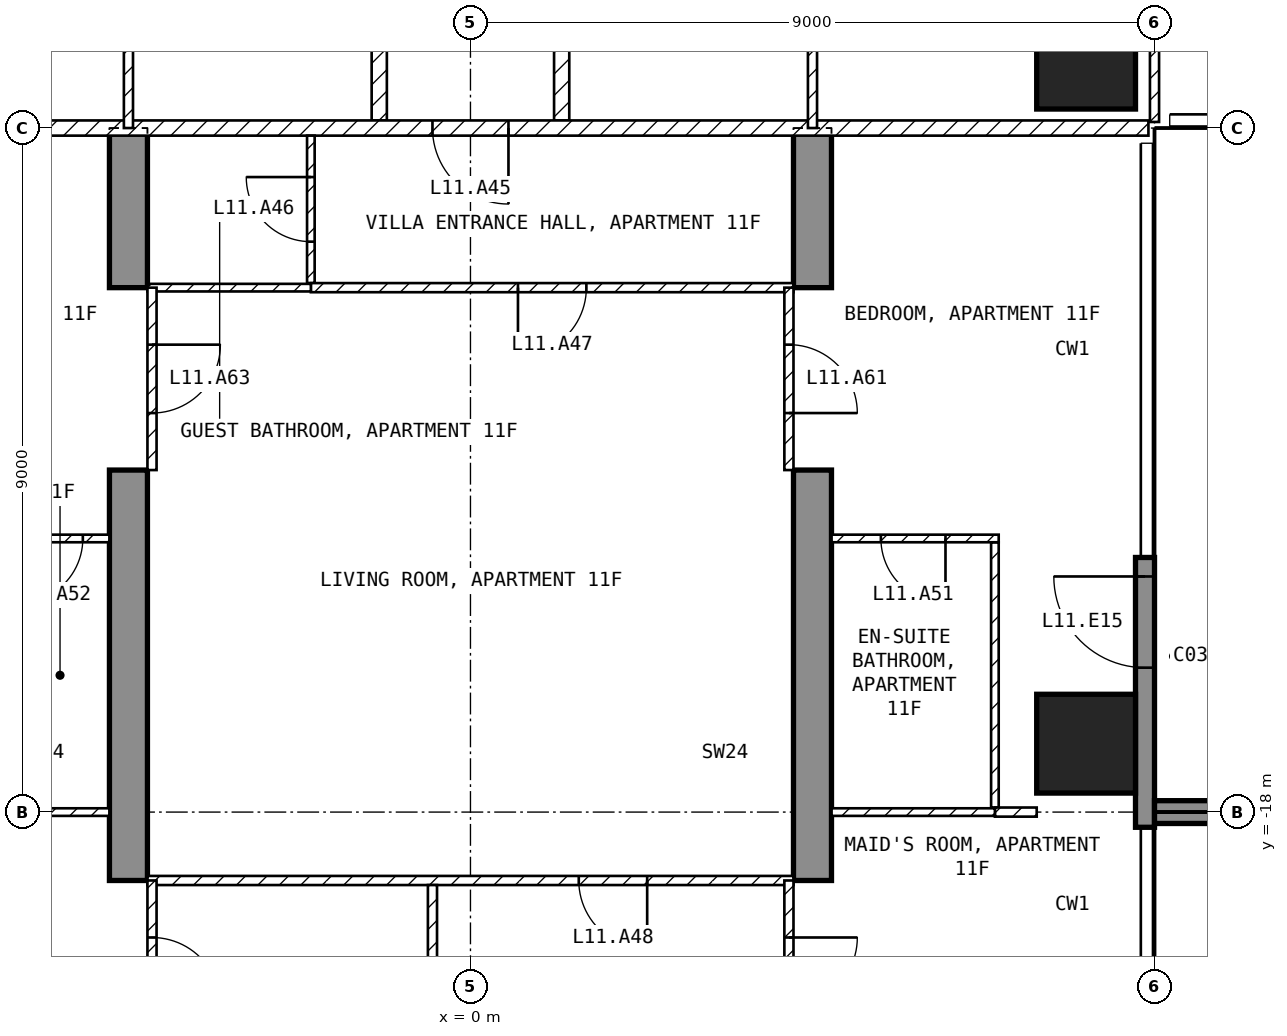
"""IFC4 building model, lengths in metres.
Left out: names, types, materials, properties, quantities, classifications, styles, units other than length and angle.
Written with IfcOpenShell. Run it as: python <this file> out.ifc"""

import sys

from ifc_helpers import new_model, si_unit, direction, frame, frame_2d, origin, origin_2d, place, context, subcontext, project, spatial, polyline, rectangle, outline, extrude, element, fill, save


model = new_model("IFC4")
c1 = context("Model", 3, precision=1e-05, world=origin(), true_north=direction((0.0, 1.0)))
c2 = subcontext(c1, "Body", "Model", "MODEL_VIEW")
j1 = project(units=[si_unit("LENGTHUNIT", "METRE"), si_unit("PLANEANGLEUNIT", "RADIAN")], contexts=[c1])
p1 = place(None, origin())
s1 = spatial("IfcSite", under=j1, at=p1, CompositionType="ELEMENT")
p2 = place(p1, origin())
s2 = spatial("IfcBuilding", under=s1, at=p2, CompositionType="ELEMENT")
p3 = place(p2, frame((0.0, 0.0, 57.5)))
s3 = spatial("IfcBuildingStorey", under=s2, at=p3, CompositionType="ELEMENT", Elevation=57.5)
for number, where, z_axis, x_axis in (
    (1, (8.1, -17.1, -0.25), (0.0, 0.0, 1.0), (1.0, 0.0, 0.0)),
    (2, (8.1, -8.1, -0.25), (0.0, 0.0, 1.0), (1.0, 0.0, 0.0)),
):
    element("IfcColumn", number, at=place(p3, frame(where, z_axis=z_axis, x_axis=x_axis)), inside=s3, PredefinedType="COLUMN", context=c2, shape_type="SweptSolid", body=[
        extrude(rectangle(XDim=1.3, YDim=1.3, at=origin_2d()), origin(), (0.0, 0.0, 1.0), 3.5),
    ])
for number, where, z_axis, x_axis in (
    (3, (-4.75, -25.45, -0.25), (1.0, 0.0, 0.0), (0.0, 1.0, 0.0)),
    (4, (4.25, -25.45, -0.25), (1.0, 0.0, 0.0), (0.0, 1.0, 0.0)),
):
    element("IfcWall", number, at=place(p3, frame(where, z_axis=z_axis, x_axis=x_axis)), inside=s3, PredefinedType="SHEAR", context=c2, shape_type="SweptSolid", body=[
        extrude(outline(polyline([(0.0, 0.0), (4.15, 0.0), (4.15, 2.65), (6.55, 2.65), (6.55, 0.0), (11.95, 0.0), (11.95, 2.65), (14.35, 2.65), (14.35, 0.0), (16.45, 0.0), (16.45, 3.5), (0.0, 3.5), (0.0, 0.0)])), origin(), (0.0, 0.0, 1.0), 0.5),
    ])
p4 = place(p3, frame((8.875, -18.2, 0.0), z_axis=(0.0, 0.0, 1.0), x_axis=(0.0, 1.0, 0.0)))
e5 = element("IfcWall", 5, at=p4, inside=s3, PredefinedType="SOLIDWALL", context=c2, shape_type="SweptSolid", body=[
    extrude(rectangle(XDim=3.55, YDim=0.25, at=frame_2d((1.775, 0.0))), origin(), (0.0, 0.0, 1.0), 3.25),
])
p5 = place(p4, frame((2.1, 0.0, 0.0)))
e6 = element("IfcOpeningElement", 6, at=p5, cuts=e5, PredefinedType="OPENING", context=c2, shape_type="SweptSolid", body=[
    extrude(rectangle(XDim=1.2, YDim=2.4, at=frame_2d((0.6, 1.2))), frame((0.0, 0.135, 0.0), z_axis=(0.0, -1.0, 0.0), x_axis=(1.0, 0.0, 0.0)), (0.0, 0.0, 1.0), 0.27),
])
p6 = place(p3, frame((9.0, -18.0, 0.0), z_axis=(0.0, 0.0, 1.0), x_axis=(1.0, 0.0, 0.0)))
e7 = element("IfcWall", 7, at=p6, inside=s3, PredefinedType="SOLIDWALL", context=c2, shape_type="SweptSolid", body=[
    extrude(rectangle(XDim=2.7, YDim=0.3, at=frame_2d((1.35, 0.0))), origin(), (0.0, 0.0, 1.0), 3.25),
])
for number, where, z_axis, x_axis in (
    (8, (1.2, -1.3, 0.0), (0.0, 0.0, 1.0), (0.0, -1.0, 0.0)),
    (9, (-1.2, -8.9, 0.0), (0.0, 0.0, 1.0), (0.0, 1.0, 0.0)),
):
    element("IfcWall", number, at=place(p3, frame(where, z_axis=z_axis, x_axis=x_axis)), inside=s3, PredefinedType="PARTITIONING", context=c2, shape_type="SweptSolid", body=[
        extrude(rectangle(XDim=7.6, YDim=0.2, at=frame_2d((3.8, 0.0))), origin(), (0.0, 0.0, 1.0), 3.25),
    ])
p7 = place(p3, frame((8.92, -9.0, 0.0), z_axis=(0.0, 0.0, 1.0), x_axis=(-1.0, 0.0, 0.0)))
e10 = element("IfcWall", 10, at=p7, inside=s3, PredefinedType="PARTITIONING", context=c2, shape_type="SweptSolid", body=[
    extrude(rectangle(XDim=17.84, YDim=0.2, at=frame_2d((8.92, 0.0))), origin(), (0.0, 0.0, 1.0), 3.25),
])
p8 = place(p7, frame((8.42, 0.0, 0.0)))
e11 = element("IfcOpeningElement", 11, at=p8, cuts=e10, PredefinedType="OPENING", context=c2, shape_type="SweptSolid", body=[
    extrude(rectangle(XDim=1.0, YDim=2.1, at=frame_2d((0.5, 1.05))), frame((0.0, 0.11, 0.0), z_axis=(0.0, -1.0, 0.0), x_axis=(1.0, 0.0, 0.0)), (0.0, 0.0, 1.0), 0.22),
])
p9 = place(p3, frame((9.0, -8.92, 0.0), z_axis=(0.0, 0.0, 1.0), x_axis=(0.0, 1.0, 0.0)))
e12 = element("IfcWall", 12, at=p9, inside=s3, PredefinedType="PARTITIONING", context=c2, shape_type="SweptSolid", body=[
    extrude(rectangle(XDim=7.62, YDim=0.12, at=frame_2d((3.81, 0.0))), origin(), (0.0, 0.0, 1.0), 3.25),
])
p10 = place(p9, frame((2.67, 0.0, 0.0)))
e13 = element("IfcOpeningElement", 13, at=p10, cuts=e12, PredefinedType="OPENING", context=c2, shape_type="SweptSolid", body=[
    extrude(rectangle(XDim=0.9, YDim=2.1, at=frame_2d((0.45, 1.05))), frame((0.0, 0.07, 0.0), z_axis=(0.0, -1.0, 0.0), x_axis=(1.0, 0.0, 0.0)), (0.0, 0.0, 1.0), 0.14),
])
p11 = place(p3, frame((4.5, -9.0, 0.0), z_axis=(0.0, 0.0, 1.0), x_axis=(0.0, 1.0, 0.0)))
e14 = element("IfcWall", 14, at=p11, inside=s3, PredefinedType="PARTITIONING", context=c2, shape_type="SweptSolid", body=[
    extrude(rectangle(XDim=7.7, YDim=0.12, at=frame_2d((3.85, 0.0))), origin(), (0.0, 0.0, 1.0), 3.25),
])
p12 = place(p11, frame((3.4, 0.0, 0.0)))
e15 = element("IfcOpeningElement", 15, at=p12, cuts=e14, PredefinedType="OPENING", context=c2, shape_type="SweptSolid", body=[
    extrude(rectangle(XDim=0.9, YDim=2.1, at=frame_2d((0.45, 1.05))), frame((0.0, 0.07, 0.0), z_axis=(0.0, -1.0, 0.0), x_axis=(1.0, 0.0, 0.0)), (0.0, 0.0, 1.0), 0.14),
])
p13 = place(p3, frame((-4.5, -1.3, 0.0), z_axis=(0.0, 0.0, 1.0), x_axis=(0.0, -1.0, 0.0)))
e16 = element("IfcWall", 16, at=p13, inside=s3, PredefinedType="PARTITIONING", context=c2, shape_type="SweptSolid", body=[
    extrude(rectangle(XDim=7.7, YDim=0.12, at=frame_2d((3.85, 0.0))), origin(), (0.0, 0.0, 1.0), 3.25),
])
p14 = place(p13, frame((4.988, 0.0, 0.0)))
e17 = element("IfcOpeningElement", 17, at=p14, cuts=e16, PredefinedType="OPENING", context=c2, shape_type="SweptSolid", body=[
    extrude(rectangle(XDim=0.9, YDim=2.1, at=frame_2d((0.45, 1.05))), frame((0.0, 0.07, 0.0), z_axis=(0.0, -1.0, 0.0), x_axis=(1.0, 0.0, 0.0)), (0.0, 0.0, 1.0), 0.14),
])
p15 = place(p3, frame((-2.1, -11.04, 0.0), z_axis=(0.0, 0.0, 1.0), x_axis=(0.0, 1.0, 0.0)))
e18 = element("IfcWall", 18, at=p15, inside=s3, PredefinedType="PARTITIONING", context=c2, shape_type="SweptSolid", body=[
    extrude(rectangle(XDim=1.94, YDim=0.1, at=frame_2d((0.97, 0.0))), origin(), (0.0, 0.0, 1.0), 3.25),
])
p16 = place(p15, frame((0.545, 0.0, 0.0)))
e19 = element("IfcOpeningElement", 19, at=p16, cuts=e18, PredefinedType="OPENING", context=c2, shape_type="SweptSolid", body=[
    extrude(rectangle(XDim=0.85, YDim=2.1, at=frame_2d((0.425, 1.05))), frame((0.0, 0.06, 0.0), z_axis=(0.0, -1.0, 0.0), x_axis=(1.0, 0.0, 0.0)), (0.0, 0.0, 1.0), 0.12),
])
p17 = place(p3, frame((4.25, -11.1, 0.0), z_axis=(0.0, 0.0, 1.0), x_axis=(-1.0, 0.0, 0.0)))
e20 = element("IfcWall", 20, at=p17, inside=s3, PredefinedType="PARTITIONING", context=c2, shape_type="SweptSolid", body=[
    extrude(rectangle(XDim=6.35, YDim=0.12, at=frame_2d((3.175, 0.0))), origin(), (0.0, 0.0, 1.0), 3.25),
])
p18 = place(p17, frame((2.725, 0.0, 0.0)))
e21 = element("IfcOpeningElement", 21, at=p18, cuts=e20, PredefinedType="OPENING", context=c2, shape_type="SweptSolid", body=[
    extrude(rectangle(XDim=0.9, YDim=2.1, at=frame_2d((0.45, 1.05))), frame((0.0, 0.07, 0.0), z_axis=(0.0, -1.0, 0.0), x_axis=(1.0, 0.0, 0.0)), (0.0, 0.0, 1.0), 0.14),
])
p19 = place(p3, frame((-2.1, -11.1, 0.0), z_axis=(0.0, 0.0, 1.0), x_axis=(-1.0, 0.0, 0.0)))
e22 = element("IfcWall", 22, at=p19, inside=s3, PredefinedType="PARTITIONING", context=c2, shape_type="SweptSolid", body=[
    extrude(rectangle(XDim=2.15, YDim=0.1, at=frame_2d((1.075, 0.0))), origin(), (0.0, 0.0, 1.0), 3.25),
])
p20 = place(p3, frame((4.25, -18.9, 0.0), z_axis=(0.0, 0.0, 1.0), x_axis=(-1.0, 0.0, 0.0)))
e23 = element("IfcWall", 23, at=p20, inside=s3, PredefinedType="PARTITIONING", context=c2, shape_type="SweptSolid", body=[
    extrude(rectangle(XDim=8.5, YDim=0.12, at=frame_2d((4.25, 0.0))), origin(), (0.0, 0.0, 1.0), 3.25),
])
p21 = place(p20, frame((1.925, 0.0, 0.0)))
e24 = element("IfcOpeningElement", 24, at=p21, cuts=e23, PredefinedType="OPENING", context=c2, shape_type="SweptSolid", body=[
    extrude(rectangle(XDim=0.9, YDim=2.1, at=frame_2d((0.45, 1.05))), frame((0.0, 0.07, 0.0), z_axis=(0.0, -1.0, 0.0), x_axis=(1.0, 0.0, 0.0)), (0.0, 0.0, 1.0), 0.14),
])
p22 = place(p3, frame((-0.5, -23.34, 0.0), z_axis=(0.0, 0.0, 1.0), x_axis=(0.0, 1.0, 0.0)))
e25 = element("IfcWall", 25, at=p22, inside=s3, PredefinedType="PARTITIONING", context=c2, shape_type="SweptSolid", body=[
    extrude(rectangle(XDim=4.38, YDim=0.12, at=frame_2d((2.19, 0.0))), origin(), (0.0, 0.0, 1.0), 3.25),
])
p23 = place(p22, frame((1.74, 0.0, 0.0)))
e26 = element("IfcOpeningElement", 26, at=p23, cuts=e25, PredefinedType="OPENING", context=c2, shape_type="SweptSolid", body=[
    extrude(rectangle(XDim=0.9, YDim=2.1, at=frame_2d((0.45, 1.05))), frame((0.0, 0.07, 0.0), z_axis=(0.0, -1.0, 0.0), x_axis=(1.0, 0.0, 0.0)), (0.0, 0.0, 1.0), 0.14),
])
p24 = place(p3, frame((6.9, -17.94, 0.0), z_axis=(0.0, 0.0, 1.0), x_axis=(0.0, 1.0, 0.0)))
e27 = element("IfcWall", 27, at=p24, inside=s3, PredefinedType="PARTITIONING", context=c2, shape_type="SweptSolid", body=[
    extrude(rectangle(XDim=3.49, YDim=0.1, at=frame_2d((1.745, 0.0))), origin(), (0.0, 0.0, 1.0), 3.25),
])
p25 = place(p3, frame((6.95, -14.4, 0.0), z_axis=(0.0, 0.0, 1.0), x_axis=(-1.0, 0.0, 0.0)))
e28 = element("IfcWall", 28, at=p25, inside=s3, PredefinedType="PARTITIONING", context=c2, shape_type="SweptSolid", body=[
    extrude(rectangle(XDim=2.2, YDim=0.1, at=frame_2d((1.1, 0.0))), origin(), (0.0, 0.0, 1.0), 3.25),
])
p26 = place(p25, frame((0.7, 0.0, 0.0)))
e29 = element("IfcOpeningElement", 29, at=p26, cuts=e28, PredefinedType="OPENING", context=c2, shape_type="SweptSolid", body=[
    extrude(rectangle(XDim=0.85, YDim=2.1, at=frame_2d((0.425, 1.05))), frame((0.0, 0.06, 0.0), z_axis=(0.0, -1.0, 0.0), x_axis=(1.0, 0.0, 0.0)), (0.0, 0.0, 1.0), 0.12),
])
p27 = place(p3, frame((7.45, -18.0, 0.0), z_axis=(0.0, 0.0, 1.0), x_axis=(-1.0, 0.0, 0.0)))
e30 = element("IfcWall", 30, at=p27, inside=s3, PredefinedType="PARTITIONING", context=c2, shape_type="SweptSolid", body=[
    extrude(rectangle(XDim=0.55, YDim=0.12, at=frame_2d((0.275, 0.0))), origin(), (0.0, 0.0, 1.0), 3.25),
])
p28 = place(p3, frame((6.9, -18.0, 0.0), z_axis=(0.0, 0.0, 1.0), x_axis=(-1.0, 0.0, 0.0)))
e31 = element("IfcWall", 31, at=p28, inside=s3, PredefinedType="PARTITIONING", context=c2, shape_type="SweptSolid", body=[
    extrude(rectangle(XDim=2.15, YDim=0.1, at=frame_2d((1.075, 0.0))), origin(), (0.0, 0.0, 1.0), 3.25),
])
p29 = place(p3, frame((-4.75, -14.4, 0.0), z_axis=(0.0, 0.0, 1.0), x_axis=(-1.0, 0.0, 0.0)))
e32 = element("IfcWall", 32, at=p29, inside=s3, PredefinedType="PARTITIONING", context=c2, shape_type="SweptSolid", body=[
    extrude(rectangle(XDim=1.6, YDim=0.1, at=frame_2d((0.8, 0.0))), origin(), (0.0, 0.0, 1.0), 3.25),
])
p30 = place(p29, frame((0.35, 0.0, 0.0)))
e33 = element("IfcOpeningElement", 33, at=p30, cuts=e32, PredefinedType="OPENING", context=c2, shape_type="SweptSolid", body=[
    extrude(rectangle(XDim=0.85, YDim=2.1, at=frame_2d((0.425, 1.05))), frame((0.0, 0.06, 0.0), z_axis=(0.0, -1.0, 0.0), x_axis=(1.0, 0.0, 0.0)), (0.0, 0.0, 1.0), 0.12),
])
p31 = place(p3, frame((-4.75, -18.0, 0.0), z_axis=(0.0, 0.0, 1.0), x_axis=(-1.0, 0.0, 0.0)))
e34 = element("IfcWall", 34, at=p31, inside=s3, PredefinedType="PARTITIONING", context=c2, shape_type="SweptSolid", body=[
    extrude(rectangle(XDim=1.55, YDim=0.1, at=frame_2d((0.775, 0.0))), origin(), (0.0, 0.0, 1.0), 3.25),
])
p32 = place(p3, frame((4.19, -11.1, 0.0), z_axis=(0.0, 0.0, 1.0), x_axis=(0.0, -1.0, 0.0)))
e35 = element("IfcWall", 35, at=p32, inside=s3, PredefinedType="PARTITIONING", context=c2, shape_type="SweptSolid", body=[
    extrude(rectangle(XDim=2.4, YDim=0.12, at=frame_2d((1.2, 0.0))), origin(), (0.0, 0.0, 1.0), 2.4),
])
p33 = place(p32, frame((0.75, 0.0, 0.0)))
e36 = element("IfcOpeningElement", 36, at=p33, cuts=e35, PredefinedType="OPENING", context=c2, shape_type="SweptSolid", body=[
    extrude(rectangle(XDim=0.9, YDim=2.1, at=frame_2d((0.45, 1.05))), frame((0.0, 0.07, 0.0), z_axis=(0.0, -1.0, 0.0), x_axis=(1.0, 0.0, 0.0)), (0.0, 0.0, 1.0), 0.14),
])
p34 = place(p3, frame((4.19, -18.9, 0.0), z_axis=(0.0, 0.0, 1.0), x_axis=(0.0, -1.0, 0.0)))
e37 = element("IfcWall", 37, at=p34, inside=s3, PredefinedType="PARTITIONING", context=c2, shape_type="SweptSolid", body=[
    extrude(rectangle(XDim=2.4, YDim=0.12, at=frame_2d((1.2, 0.0))), origin(), (0.0, 0.0, 1.0), 2.4),
])
p35 = place(p34, frame((0.75, 0.0, 0.0)))
e38 = element("IfcOpeningElement", 38, at=p35, cuts=e37, PredefinedType="OPENING", context=c2, shape_type="SweptSolid", body=[
    extrude(rectangle(XDim=0.9, YDim=2.1, at=frame_2d((0.45, 1.05))), frame((0.0, 0.07, 0.0), z_axis=(0.0, -1.0, 0.0), x_axis=(1.0, 0.0, 0.0)), (0.0, 0.0, 1.0), 0.14),
])
p36 = place(p3, frame((-4.19, -11.1, 0.0), z_axis=(0.0, 0.0, 1.0), x_axis=(0.0, -1.0, 0.0)))
e39 = element("IfcWall", 39, at=p36, inside=s3, PredefinedType="PARTITIONING", context=c2, shape_type="SweptSolid", body=[
    extrude(rectangle(XDim=2.4, YDim=0.12, at=frame_2d((1.2, 0.0))), origin(), (0.0, 0.0, 1.0), 2.4),
])
p37 = place(p36, frame((0.75, 0.0, 0.0)))
e40 = element("IfcOpeningElement", 40, at=p37, cuts=e39, PredefinedType="OPENING", context=c2, shape_type="SweptSolid", body=[
    extrude(rectangle(XDim=0.9, YDim=2.1, at=frame_2d((0.45, 1.05))), frame((0.0, 0.07, 0.0), z_axis=(0.0, -1.0, 0.0), x_axis=(1.0, 0.0, 0.0)), (0.0, 0.0, 1.0), 0.14),
])
p38 = place(p3, frame((-4.19, -18.9, 0.0), z_axis=(0.0, 0.0, 1.0), x_axis=(0.0, -1.0, 0.0)))
e41 = element("IfcWall", 41, at=p38, inside=s3, PredefinedType="PARTITIONING", context=c2, shape_type="SweptSolid", body=[
    extrude(rectangle(XDim=2.4, YDim=0.12, at=frame_2d((1.2, 0.0))), origin(), (0.0, 0.0, 1.0), 2.4),
])
p39 = place(p38, frame((0.75, 0.0, 0.0)))
e42 = element("IfcOpeningElement", 42, at=p39, cuts=e41, PredefinedType="OPENING", context=c2, shape_type="SweptSolid", body=[
    extrude(rectangle(XDim=0.9, YDim=2.1, at=frame_2d((0.45, 1.05))), frame((0.0, 0.07, 0.0), z_axis=(0.0, -1.0, 0.0), x_axis=(1.0, 0.0, 0.0)), (0.0, 0.0, 1.0), 0.14),
])
p40 = place(p5, origin())
e43 = element("IfcDoor", 43, at=p40, inside=s3, OperationType="SINGLE_SWING_RIGHT", PredefinedType="DOOR", context=c2, shape_type="SweptSolid", body=[
    extrude(rectangle(XDim=1.2, YDim=2.4, at=frame_2d((0.6, 1.2))), frame((0.0, 0.025, 0.0), z_axis=(0.0, -1.0, 0.0), x_axis=(1.0, 0.0, 0.0)), (0.0, 0.0, 1.0), 0.05),
])
fill(e6, e43)
p41 = place(p8, origin())
e44 = element("IfcDoor", 44, at=p41, inside=s3, OperationType="SINGLE_SWING_LEFT", PredefinedType="DOOR", context=c2, shape_type="SweptSolid", body=[
    extrude(rectangle(XDim=1.0, YDim=2.1, at=frame_2d((0.5, 1.05))), frame((0.0, 0.025, 0.0), z_axis=(0.0, -1.0, 0.0), x_axis=(1.0, 0.0, 0.0)), (0.0, 0.0, 1.0), 0.05),
])
fill(e11, e44)
p42 = place(p16, origin())
e45 = element("IfcDoor", 45, at=p42, inside=s3, OperationType="SINGLE_SWING_RIGHT", PredefinedType="DOOR", context=c2, shape_type="SweptSolid", body=[
    extrude(rectangle(XDim=0.85, YDim=2.1, at=frame_2d((0.425, 1.05))), frame((0.0, 0.025, 0.0), z_axis=(0.0, -1.0, 0.0), x_axis=(1.0, 0.0, 0.0)), (0.0, 0.0, 1.0), 0.05),
])
fill(e19, e45)
p43 = place(p18, origin())
e46 = element("IfcDoor", 46, at=p43, inside=s3, OperationType="SINGLE_SWING_RIGHT", PredefinedType="DOOR", context=c2, shape_type="SweptSolid", body=[
    extrude(rectangle(XDim=0.9, YDim=2.1, at=frame_2d((0.45, 1.05))), frame((0.0, 0.025, 0.0), z_axis=(0.0, -1.0, 0.0), x_axis=(1.0, 0.0, 0.0)), (0.0, 0.0, 1.0), 0.05),
])
fill(e21, e46)
p44 = place(p21, origin())
e47 = element("IfcDoor", 47, at=p44, inside=s3, OperationType="SINGLE_SWING_LEFT", PredefinedType="DOOR", context=c2, shape_type="SweptSolid", body=[
    extrude(rectangle(XDim=0.9, YDim=2.1, at=frame_2d((0.45, 1.05))), frame((0.0, 0.025, 0.0), z_axis=(0.0, -1.0, 0.0), x_axis=(1.0, 0.0, 0.0)), (0.0, 0.0, 1.0), 0.05),
])
fill(e24, e47)
p45 = place(p26, origin())
e48 = element("IfcDoor", 48, at=p45, inside=s3, OperationType="SINGLE_SWING_LEFT", PredefinedType="DOOR", context=c2, shape_type="SweptSolid", body=[
    extrude(rectangle(XDim=0.85, YDim=2.1, at=frame_2d((0.425, 1.05))), frame((0.0, 0.025, 0.0), z_axis=(0.0, -1.0, 0.0), x_axis=(1.0, 0.0, 0.0)), (0.0, 0.0, 1.0), 0.05),
])
fill(e29, e48)
p46 = place(p30, origin())
e49 = element("IfcDoor", 49, at=p46, inside=s3, OperationType="SINGLE_SWING_RIGHT", PredefinedType="DOOR", context=c2, shape_type="SweptSolid", body=[
    extrude(rectangle(XDim=0.85, YDim=2.1, at=frame_2d((0.425, 1.05))), frame((0.0, 0.025, 0.0), z_axis=(0.0, -1.0, 0.0), x_axis=(1.0, 0.0, 0.0)), (0.0, 0.0, 1.0), 0.05),
])
fill(e33, e49)
p47 = place(p33, origin())
e50 = element("IfcDoor", 50, at=p47, inside=s3, OperationType="SINGLE_SWING_RIGHT", PredefinedType="DOOR", context=c2, shape_type="SweptSolid", body=[
    extrude(rectangle(XDim=0.9, YDim=2.1, at=frame_2d((0.45, 1.05))), frame((0.0, 0.025, 0.0), z_axis=(0.0, -1.0, 0.0), x_axis=(1.0, 0.0, 0.0)), (0.0, 0.0, 1.0), 0.05),
])
fill(e36, e50)
p48 = place(p35, origin())
e51 = element("IfcDoor", 51, at=p48, inside=s3, OperationType="SINGLE_SWING_LEFT", PredefinedType="DOOR", context=c2, shape_type="SweptSolid", body=[
    extrude(rectangle(XDim=0.9, YDim=2.1, at=frame_2d((0.45, 1.05))), frame((0.0, 0.025, 0.0), z_axis=(0.0, -1.0, 0.0), x_axis=(1.0, 0.0, 0.0)), (0.0, 0.0, 1.0), 0.05),
])
fill(e38, e51)
p49 = place(p37, origin())
e52 = element("IfcDoor", 52, at=p49, inside=s3, OperationType="SINGLE_SWING_LEFT", PredefinedType="DOOR", context=c2, shape_type="SweptSolid", body=[
    extrude(rectangle(XDim=0.9, YDim=2.1, at=frame_2d((0.45, 1.05))), frame((0.0, 0.025, 0.0), z_axis=(0.0, -1.0, 0.0), x_axis=(1.0, 0.0, 0.0)), (0.0, 0.0, 1.0), 0.05),
])
fill(e40, e52)
p50 = place(p39, origin())
e53 = element("IfcDoor", 53, at=p50, inside=s3, OperationType="SINGLE_SWING_RIGHT", PredefinedType="DOOR", context=c2, shape_type="SweptSolid", body=[
    extrude(rectangle(XDim=0.9, YDim=2.1, at=frame_2d((0.45, 1.05))), frame((0.0, 0.025, 0.0), z_axis=(0.0, -1.0, 0.0), x_axis=(1.0, 0.0, 0.0)), (0.0, 0.0, 1.0), 0.05),
])
fill(e42, e53)
save(model, sys.argv[1])
